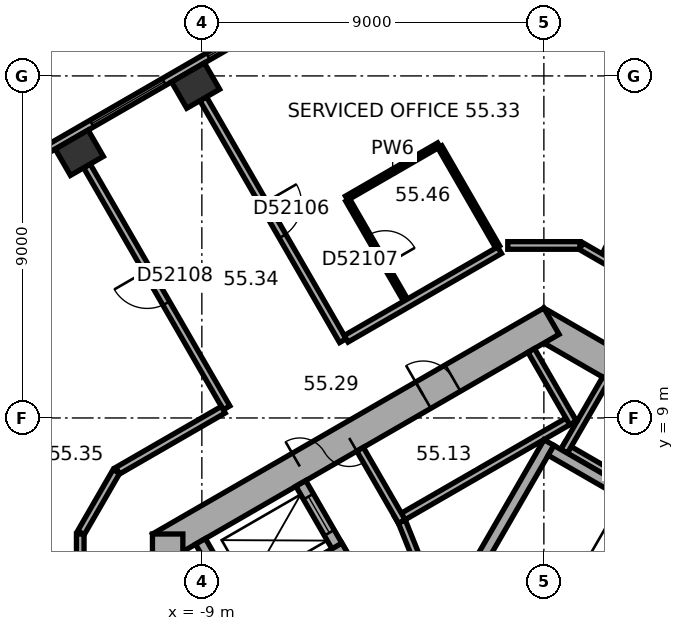
"""IFC4 building model, lengths in metres.
Left out: names, types, materials, properties, quantities, classifications, styles, units other than length and angle.
Written with IfcOpenShell. Run it as: python <this file> out.ifc"""

import sys

from ifc_helpers import new_model, si_unit, direction, frame, frame_2d, origin, origin_2d, place, context, subcontext, project, spatial, rectangle, extrude, element, fill, save


model = new_model("IFC4")
c1 = context("Model", 3, precision=1e-05, world=origin(), true_north=direction((0.0, 1.0)))
c2 = subcontext(c1, "Body", "Model", "MODEL_VIEW")
j1 = project(units=[si_unit("LENGTHUNIT", "METRE"), si_unit("PLANEANGLEUNIT", "RADIAN")], contexts=[c1])
p1 = place(None, origin())
s1 = spatial("IfcSite", under=j1, at=p1, CompositionType="ELEMENT")
p2 = place(p1, origin())
s2 = spatial("IfcBuilding", under=s1, at=p2, CompositionType="ELEMENT")
p3 = place(p2, frame((0.0, 0.0, 225.4)))
s3 = spatial("IfcBuildingStorey", under=s2, at=p3, CompositionType="ELEMENT", Elevation=225.4)
for number, where, z_axis, x_axis in (
    (1, (-9.165, 17.745, 0.0), (0.0, 0.0, 1.0), (-0.866, -0.5, 0.0)),
    (2, (-12.225, 15.978, 0.0), (0.0, 0.0, 1.0), (-0.866, -0.5, 0.0)),
):
    element("IfcColumn", number, at=place(p3, frame(where, z_axis=z_axis, x_axis=x_axis)), inside=s3, PredefinedType="COLUMN", context=c2, shape_type="SweptSolid", body=[
        extrude(rectangle(XDim=1.0, YDim=0.8, at=origin_2d()), origin(), (0.0, 0.0, 1.0), 3.7),
    ])
p4 = place(p3, frame((10.1, 5.6, 0.0), z_axis=(0.0, 0.0, 1.0), x_axis=(-0.866023897231, 0.500002609418, 0.0)))
e3 = element("IfcWall", 3, at=p4, inside=s3, PredefinedType="SHEAR", context=c2, shape_type="SweptSolid", body=[
    extrude(rectangle(XDim=11.894, YDim=0.8, at=frame_2d((5.947, 0.0))), origin(), (0.0, 0.0, 1.0), 3.7),
])
p5 = place(p4, frame((3.897, 0.0, 0.0)))
e4 = element("IfcOpeningElement", 4, at=p5, cuts=e3, PredefinedType="OPENING", context=c2, shape_type="SweptSolid", body=[
    extrude(rectangle(XDim=0.9, YDim=2.1, at=frame_2d((0.45, 1.05))), frame((0.0, 0.41, 0.0), z_axis=(0.0, -1.0, 0.0), x_axis=(1.0, 0.0, 0.0)), (0.0, 0.0, 1.0), 0.82),
])
p6 = place(p4, frame((7.797, 0.0, 0.0)))
e5 = element("IfcOpeningElement", 5, at=p6, cuts=e3, PredefinedType="OPENING", context=c2, shape_type="SweptSolid", body=[
    extrude(rectangle(XDim=0.9, YDim=2.1, at=frame_2d((0.45, 1.05))), frame((0.0, 0.41, 0.0), z_axis=(0.0, -1.0, 0.0), x_axis=(1.0, 0.0, 0.0)), (0.0, 0.0, 1.0), 0.82),
])
p7 = place(p3, frame((0.2, 11.547, 0.0), z_axis=(0.0, 0.0, 1.0), x_axis=(-0.866023897231, -0.500002609418, 0.0)))
e6 = element("IfcWall", 6, at=p7, inside=s3, PredefinedType="SHEAR", context=c2, shape_type="SweptSolid", body=[
    extrude(rectangle(XDim=11.894, YDim=0.8, at=frame_2d((5.947, 0.0))), origin(), (0.0, 0.0, 1.0), 3.7),
])
p8 = place(p7, frame((6.147, 0.0, 0.0)))
e7 = element("IfcOpeningElement", 7, at=p8, cuts=e6, PredefinedType="OPENING", context=c2, shape_type="SweptSolid", body=[
    extrude(rectangle(XDim=1.5, YDim=2.1, at=frame_2d((0.75, 1.05))), frame((0.0, 0.41, 0.0), z_axis=(0.0, -1.0, 0.0), x_axis=(1.0, 0.0, 0.0)), (0.0, 0.0, 1.0), 0.82),
])
p9 = place(p7, frame((2.997, 0.0, 0.0)))
e8 = element("IfcOpeningElement", 8, at=p9, cuts=e6, PredefinedType="OPENING", context=c2, shape_type="SweptSolid", body=[
    extrude(rectangle(XDim=0.9, YDim=2.1, at=frame_2d((0.45, 1.05))), frame((0.0, 0.41, 0.0), z_axis=(0.0, -1.0, 0.0), x_axis=(1.0, 0.0, 0.0)), (0.0, 0.0, 1.0), 0.82),
])
p10 = place(p3, frame((-9.9, 5.947, 0.0), z_axis=(0.0, 0.0, 1.0), x_axis=(0.0, -1.0, 0.0)))
e9 = element("IfcWall", 9, at=p10, inside=s3, PredefinedType="SHEAR", context=c2, shape_type="SweptSolid", body=[
    extrude(rectangle(XDim=11.894, YDim=0.8, at=frame_2d((5.947, 0.0))), origin(), (0.0, 0.0, 1.0), 3.7),
])
p11 = place(p10, frame((5.097, 0.0, 0.0)))
e10 = element("IfcOpeningElement", 10, at=p11, cuts=e9, PredefinedType="OPENING", context=c2, shape_type="SweptSolid", body=[
    extrude(rectangle(XDim=1.1, YDim=2.1, at=frame_2d((0.55, 1.05))), frame((0.0, 0.41, 0.0), z_axis=(0.0, -1.0, 0.0), x_axis=(1.0, 0.0, 0.0)), (0.0, 0.0, 1.0), 0.82),
])
p12 = place(p10, frame((7.697, 0.0, 0.0)))
e11 = element("IfcOpeningElement", 11, at=p12, cuts=e9, PredefinedType="OPENING", context=c2, shape_type="SweptSolid", body=[
    extrude(rectangle(XDim=1.1, YDim=2.1, at=frame_2d((0.55, 1.05))), frame((0.0, 0.41, 0.0), z_axis=(0.0, -1.0, 0.0), x_axis=(1.0, 0.0, 0.0)), (0.0, 0.0, 1.0), 0.82),
])
p13 = place(p3, frame((18.299, 13.727, 0.0), z_axis=(0.0, 0.0, 1.0), x_axis=(-0.894934554817, 0.44619742558, 0.0)))
e12 = element("IfcWall", 12, at=p13, inside=s3, PredefinedType="STANDARD", context=c2, shape_type="SweptSolid", body=[
    extrude(rectangle(XDim=18.841, YDim=0.2, at=frame_2d((9.421, 0.0))), origin(), (0.0, 0.0, 1.0), 3.7),
])
p14 = place(p13, frame((1.253, 0.0, 0.9)))
e13 = element("IfcOpeningElement", 13, at=p14, cuts=e12, PredefinedType="OPENING", context=c2, shape_type="SweptSolid", body=[
    extrude(rectangle(XDim=2.2, YDim=2.0, at=frame_2d((1.1, 1.0))), frame((0.0, 0.11, 0.0), z_axis=(0.0, -1.0, 0.0), x_axis=(1.0, 0.0, 0.0)), (0.0, 0.0, 1.0), 0.22),
])
p15 = place(p13, frame((4.786, 0.0, 0.9)))
e14 = element("IfcOpeningElement", 14, at=p15, cuts=e12, PredefinedType="OPENING", context=c2, shape_type="SweptSolid", body=[
    extrude(rectangle(XDim=2.2, YDim=2.0, at=frame_2d((1.1, 1.0))), frame((0.0, 0.11, 0.0), z_axis=(0.0, -1.0, 0.0), x_axis=(1.0, 0.0, 0.0)), (0.0, 0.0, 1.0), 0.22),
])
p16 = place(p13, frame((8.32, 0.0, 0.9)))
e15 = element("IfcOpeningElement", 15, at=p16, cuts=e12, PredefinedType="OPENING", context=c2, shape_type="SweptSolid", body=[
    extrude(rectangle(XDim=2.2, YDim=2.0, at=frame_2d((1.1, 1.0))), frame((0.0, 0.11, 0.0), z_axis=(0.0, -1.0, 0.0), x_axis=(1.0, 0.0, 0.0)), (0.0, 0.0, 1.0), 0.22),
])
p17 = place(p13, frame((11.854, 0.0, 0.9)))
e16 = element("IfcOpeningElement", 16, at=p17, cuts=e12, PredefinedType="OPENING", context=c2, shape_type="SweptSolid", body=[
    extrude(rectangle(XDim=2.2, YDim=2.0, at=frame_2d((1.1, 1.0))), frame((0.0, 0.11, 0.0), z_axis=(0.0, -1.0, 0.0), x_axis=(1.0, 0.0, 0.0)), (0.0, 0.0, 1.0), 0.22),
])
p18 = place(p13, frame((15.387, 0.0, 0.9)))
e17 = element("IfcOpeningElement", 17, at=p18, cuts=e12, PredefinedType="OPENING", context=c2, shape_type="SweptSolid", body=[
    extrude(rectangle(XDim=2.2, YDim=2.0, at=frame_2d((1.1, 1.0))), frame((0.0, 0.11, 0.0), z_axis=(0.0, -1.0, 0.0), x_axis=(1.0, 0.0, 0.0)), (0.0, 0.0, 1.0), 0.22),
])
p19 = place(p3, frame((-2.786, 22.005, 0.0), z_axis=(0.0, 0.0, 1.0), x_axis=(-0.866026555358, -0.49999800541, 0.0)))
e18 = element("IfcWall", 18, at=p19, inside=s3, PredefinedType="STANDARD", context=c2, shape_type="SweptSolid", body=[
    extrude(rectangle(XDim=18.841, YDim=0.2, at=frame_2d((9.421, 0.0))), origin(), (0.0, 0.0, 1.0), 3.7),
])
p20 = place(p19, frame((1.254, 0.0, 0.9)))
e19 = element("IfcOpeningElement", 19, at=p20, cuts=e18, PredefinedType="OPENING", context=c2, shape_type="SweptSolid", body=[
    extrude(rectangle(XDim=2.2, YDim=2.0, at=frame_2d((1.1, 1.0))), frame((0.0, 0.11, 0.0), z_axis=(0.0, -1.0, 0.0), x_axis=(1.0, 0.0, 0.0)), (0.0, 0.0, 1.0), 0.22),
])
p21 = place(p19, frame((4.788, 0.0, 0.9)))
e20 = element("IfcOpeningElement", 20, at=p21, cuts=e18, PredefinedType="OPENING", context=c2, shape_type="SweptSolid", body=[
    extrude(rectangle(XDim=2.2, YDim=2.0, at=frame_2d((1.1, 1.0))), frame((0.0, 0.11, 0.0), z_axis=(0.0, -1.0, 0.0), x_axis=(1.0, 0.0, 0.0)), (0.0, 0.0, 1.0), 0.22),
])
p22 = place(p19, frame((8.321, 0.0, 0.9)))
e21 = element("IfcOpeningElement", 21, at=p22, cuts=e18, PredefinedType="OPENING", context=c2, shape_type="SweptSolid", body=[
    extrude(rectangle(XDim=2.2, YDim=2.0, at=frame_2d((1.1, 1.0))), frame((0.0, 0.11, 0.0), z_axis=(0.0, -1.0, 0.0), x_axis=(1.0, 0.0, 0.0)), (0.0, 0.0, 1.0), 0.22),
])
p23 = place(p19, frame((11.855, 0.0, 0.9)))
e22 = element("IfcOpeningElement", 22, at=p23, cuts=e18, PredefinedType="OPENING", context=c2, shape_type="SweptSolid", body=[
    extrude(rectangle(XDim=2.2, YDim=2.0, at=frame_2d((1.1, 1.0))), frame((0.0, 0.11, 0.0), z_axis=(0.0, -1.0, 0.0), x_axis=(1.0, 0.0, 0.0)), (0.0, 0.0, 1.0), 0.22),
])
p24 = place(p19, frame((15.389, 0.0, 0.9)))
e23 = element("IfcOpeningElement", 23, at=p24, cuts=e18, PredefinedType="OPENING", context=c2, shape_type="SweptSolid", body=[
    extrude(rectangle(XDim=2.2, YDim=2.0, at=frame_2d((1.1, 1.0))), frame((0.0, 0.11, 0.0), z_axis=(0.0, -1.0, 0.0), x_axis=(1.0, 0.0, 0.0)), (0.0, 0.0, 1.0), 0.22),
])
p25 = place(p3, frame((7.424, 4.259, 0.0), z_axis=(0.0, 0.0, 1.0), x_axis=(-0.866026010844, 0.49999894854, 0.0)))
e24 = element("IfcWall", 24, at=p25, inside=s3, PredefinedType="PARTITIONING", context=c2, shape_type="SweptSolid", body=[
    extrude(rectangle(XDim=8.0, YDim=0.2, at=frame_2d((4.0, 0.0))), origin(), (0.0, 0.0, 1.0), 3.42),
])
p26 = place(p3, frame((0.532, 8.122, 0.0), z_axis=(0.0, 0.0, 1.0), x_axis=(0.500077893725, 0.86598042715, 0.0)))
e25 = element("IfcWall", 25, at=p26, inside=s3, PredefinedType="PARTITIONING", context=c2, shape_type="SweptSolid", body=[
    extrude(rectangle(XDim=2.2, YDim=0.2, at=frame_2d((1.1, 0.0))), origin(), (0.0, 0.0, 1.0), 3.42),
])
p27 = place(p3, frame((0.803, 9.009, 0.0), z_axis=(0.0, 0.0, 1.0), x_axis=(-0.866028230842, -0.499995103361, 0.0)))
e26 = element("IfcWall", 26, at=p27, inside=s3, PredefinedType="PARTITIONING", context=c2, shape_type="SweptSolid", body=[
    extrude(rectangle(XDim=5.4, YDim=0.2, at=frame_2d((2.7, 0.0))), origin(), (0.0, 0.0, 1.0), 3.42),
])
p28 = place(p3, frame((0.767, 8.872, 0.0), z_axis=(0.0, 0.0, 1.0), x_axis=(-0.499994660107, 0.866028486751, 0.0)))
e27 = element("IfcWall", 27, at=p28, inside=s3, PredefinedType="PARTITIONING", context=c2, shape_type="SweptSolid", body=[
    extrude(rectangle(XDim=2.2, YDim=0.2, at=frame_2d((1.1, 0.0))), origin(), (0.0, 0.0, 1.0), 3.42),
])
p29 = place(p3, frame((-3.737, 6.272, 0.0), z_axis=(0.0, 0.0, 1.0), x_axis=(-0.50002983664, 0.866008176907, 0.0)))
e28 = element("IfcWall", 28, at=p29, inside=s3, PredefinedType="PARTITIONING", context=c2, shape_type="SweptSolid", body=[
    extrude(rectangle(XDim=2.2, YDim=0.2, at=frame_2d((1.1, 0.0))), origin(), (0.0, 0.0, 1.0), 3.42),
])
p30 = place(p3, frame((-2.216, 4.282, 0.0), z_axis=(0.0, 0.0, 1.0), x_axis=(0.499977259774, 0.866038532462, 0.0)))
e29 = element("IfcWall", 29, at=p30, inside=s3, PredefinedType="SHEAR", context=c2, shape_type="SweptSolid", body=[
    extrude(rectangle(XDim=4.7, YDim=0.3, at=frame_2d((2.35, 0.0))), origin(), (0.0, 0.0, 1.0), 3.42),
])
p31 = place(p3, frame((6.303, 4.617, 0.0), z_axis=(0.0, 0.0, 1.0), x_axis=(-0.866027801685, 0.499995846692, 0.0)))
e30 = element("IfcWall", 30, at=p31, inside=s3, PredefinedType="SHEAR", context=c2, shape_type="SweptSolid", body=[
    extrude(rectangle(XDim=7.06, YDim=0.3, at=frame_2d((3.53, 0.0))), origin(), (0.0, 0.0, 1.0), 3.42),
])
p32 = place(p3, frame((-5.295, 5.372, 0.0), z_axis=(0.0, 0.0, 1.0), x_axis=(-0.500077893725, 0.86598042715, 0.0)))
e31 = element("IfcWall", 31, at=p32, inside=s3, PredefinedType="SHEAR", context=c2, shape_type="SweptSolid", body=[
    extrude(rectangle(XDim=2.2, YDim=0.3, at=frame_2d((1.1, 0.0))), origin(), (0.0, 0.0, 1.0), 3.42),
])
p33 = place(p32, frame((0.7, 0.0, 0.0)))
e32 = element("IfcOpeningElement", 32, at=p33, cuts=e31, PredefinedType="OPENING", context=c2, shape_type="SweptSolid", body=[
    extrude(rectangle(XDim=1.1, YDim=2.1, at=frame_2d((0.55, 1.05))), frame((0.0, 0.16, 0.0), z_axis=(0.0, -1.0, 0.0), x_axis=(1.0, 0.0, 0.0)), (0.0, 0.0, 1.0), 0.32),
])
p34 = place(p3, frame((-5.24, 5.577, 0.0), z_axis=(0.0, 0.0, 1.0), x_axis=(-0.866014461049, -0.500018952895, 0.0)))
e33 = element("IfcWall", 33, at=p34, inside=s3, PredefinedType="SHEAR", context=c2, shape_type="SweptSolid", body=[
    extrude(rectangle(XDim=3.35, YDim=0.3, at=frame_2d((1.675, 0.0))), origin(), (0.0, 0.0, 1.0), 3.42),
])
p35 = place(p3, frame((-7.937, 3.847, 0.0), z_axis=(0.0, 0.0, 1.0), x_axis=(-0.50002983664, 0.866008176907, 0.0)))
e34 = element("IfcWall", 34, at=p35, inside=s3, PredefinedType="SHEAR", context=c2, shape_type="SweptSolid", body=[
    extrude(rectangle(XDim=2.2, YDim=0.3, at=frame_2d((1.1, 0.0))), origin(), (0.0, 0.0, 1.0), 3.42),
])
p36 = place(p3, frame((-2.615, 3.487, 0.0), z_axis=(0.0, 0.0, 1.0), x_axis=(-0.373576831041, 0.92759924068, 0.0)))
e35 = element("IfcWall", 35, at=p36, inside=s3, PredefinedType="PARTITIONING", context=c2, shape_type="SweptSolid", body=[
    extrude(rectangle(XDim=3.002, YDim=0.2, at=frame_2d((1.501, 0.0))), origin(), (0.0, 0.0, 1.0), 3.42),
])
p37 = place(p36, frame((1.15, 0.0, 0.0)))
e36 = element("IfcOpeningElement", 36, at=p37, cuts=e35, PredefinedType="OPENING", context=c2, shape_type="SweptSolid", body=[
    extrude(rectangle(XDim=0.9, YDim=2.1, at=frame_2d((0.45, 1.05))), frame((0.0, 0.11, 0.0), z_axis=(0.0, -1.0, 0.0), x_axis=(1.0, 0.0, 0.0)), (0.0, 0.0, 1.0), 0.22),
])
p38 = place(p3, frame((-12.2, 5.947, 0.0), z_axis=(0.0, 0.0, 1.0), x_axis=(0.0, -1.0, 0.0)))
e37 = element("IfcWall", 37, at=p38, inside=s3, PredefinedType="PARTITIONING", context=c2, shape_type="SweptSolid", body=[
    extrude(rectangle(XDim=3.746, YDim=0.2, at=frame_2d((1.873, 0.0))), origin(), (0.0, 0.0, 1.0), 3.42),
])
p39 = place(p3, frame((-12.025, 15.632, 0.0), z_axis=(0.0, 0.0, 1.0), x_axis=(0.499983153418, -0.866035129944, 0.0)))
e38 = element("IfcWall", 38, at=p39, inside=s3, PredefinedType="PARTITIONING", context=c2, shape_type="SweptSolid", body=[
    extrude(rectangle(XDim=7.35, YDim=0.2, at=frame_2d((3.675, 0.0))), origin(), (0.0, 0.0, 1.0), 3.42),
])
p40 = place(p39, frame((3.175, 0.0, 0.0)))
e39 = element("IfcOpeningElement", 39, at=p40, cuts=e38, PredefinedType="OPENING", context=c2, shape_type="SweptSolid", body=[
    extrude(rectangle(XDim=1.0, YDim=2.1, at=frame_2d((0.5, 1.05))), frame((0.0, 0.11, 0.0), z_axis=(0.0, -1.0, 0.0), x_axis=(1.0, 0.0, 0.0)), (0.0, 0.0, 1.0), 0.22),
])
p41 = place(p3, frame((-11.25, 7.592, 0.0), z_axis=(0.0, 0.0, 1.0), x_axis=(-0.499964847546, -0.866045698112, 0.0)))
e40 = element("IfcWall", 40, at=p41, inside=s3, PredefinedType="PARTITIONING", context=c2, shape_type="SweptSolid", body=[
    extrude(rectangle(XDim=1.86, YDim=0.2, at=frame_2d((0.93, 0.0))), origin(), (0.0, 0.0, 1.0), 3.42),
])
p42 = place(p3, frame((-8.965, 17.399, 0.0), z_axis=(0.0, 0.0, 1.0), x_axis=(0.499993683172, -0.866029050776, 0.0)))
e41 = element("IfcWall", 41, at=p42, inside=s3, PredefinedType="PARTITIONING", context=c2, shape_type="SweptSolid", body=[
    extrude(rectangle(XDim=7.35, YDim=0.2, at=frame_2d((3.675, 0.0))), origin(), (0.0, 0.0, 1.0), 2.87),
])
p43 = place(p42, frame((3.175, 0.0, 0.0)))
e42 = element("IfcOpeningElement", 42, at=p43, cuts=e41, PredefinedType="OPENING", context=c2, shape_type="SweptSolid", body=[
    extrude(rectangle(XDim=1.0, YDim=2.1, at=frame_2d((0.5, 1.05))), frame((0.0, 0.11, 0.0), z_axis=(0.0, -1.0, 0.0), x_axis=(1.0, 0.0, 0.0)), (0.0, 0.0, 1.0), 0.22),
])
p44 = place(p3, frame((-8.437, 9.217, 0.0), z_axis=(0.0, 0.0, 1.0), x_axis=(-0.866005660673, -0.500034194513, 0.0)))
e43 = element("IfcWall", 43, at=p44, inside=s3, PredefinedType="PARTITIONING", context=c2, shape_type="SweptSolid", body=[
    extrude(rectangle(XDim=3.209, YDim=0.2, at=frame_2d((1.604, 0.0))), origin(), (0.0, 0.0, 1.0), 3.42),
])
p45 = place(p3, frame((-5.191, 14.785, 0.0), z_axis=(0.0, 0.0, 1.0), x_axis=(0.866034573852, 0.49998411664, 0.0)))
e44 = element("IfcWall", 44, at=p45, inside=s3, PredefinedType="PARTITIONING", context=c2, shape_type="SweptSolid", body=[
    extrude(rectangle(XDim=2.8, YDim=0.12, at=frame_2d((1.4, 0.0))), origin(), (0.0, 0.0, 1.0), 3.42),
])
p46 = place(p3, frame((-3.641, 12.101, 0.0), z_axis=(0.0, 0.0, 1.0), x_axis=(-0.500026023896, 0.86601037836, 0.0)))
e45 = element("IfcWall", 45, at=p46, inside=s3, PredefinedType="PARTITIONING", context=c2, shape_type="SweptSolid", body=[
    extrude(rectangle(XDim=3.04, YDim=0.12, at=frame_2d((1.52, 0.0))), origin(), (0.0, 0.0, 1.0), 3.42),
])
p47 = place(p46, frame((1.07, 0.0, 0.0)))
e46 = element("IfcOpeningElement", 46, at=p47, cuts=e45, PredefinedType="OPENING", context=c2, shape_type="SweptSolid", body=[
    extrude(rectangle(XDim=0.9, YDim=2.1, at=frame_2d((0.45, 1.05))), frame((0.0, 0.07, 0.0), z_axis=(0.0, -1.0, 0.0), x_axis=(1.0, 0.0, 0.0)), (0.0, 0.0, 1.0), 0.14),
])
p48 = place(p3, frame((-2.737, 16.133, 0.0), z_axis=(0.0, 0.0, 1.0), x_axis=(0.500026023896, -0.86601037836, 0.0)))
e47 = element("IfcWall", 47, at=p48, inside=s3, PredefinedType="PARTITIONING", context=c2, shape_type="SweptSolid", body=[
    extrude(rectangle(XDim=3.04, YDim=0.12, at=frame_2d((1.52, 0.0))), origin(), (0.0, 0.0, 1.0), 3.42),
])
p49 = place(p3, frame((-1.167, 13.414, 0.0), z_axis=(0.0, 0.0, 1.0), x_axis=(-0.866023347809, -0.500003561037, 0.0)))
e48 = element("IfcWall", 48, at=p49, inside=s3, PredefinedType="PARTITIONING", context=c2, shape_type="SweptSolid", body=[
    extrude(rectangle(XDim=4.661, YDim=0.2, at=frame_2d((2.331, 0.0))), origin(), (0.0, 0.0, 1.0), 3.42),
])
p50 = place(p3, frame((0.95, 13.539, 0.0), z_axis=(0.0, 0.0, 1.0), x_axis=(-1.0, 0.0, 0.0)))
e49 = element("IfcWall", 49, at=p50, inside=s3, PredefinedType="PARTITIONING", context=c2, shape_type="SweptSolid", body=[
    extrude(rectangle(XDim=1.9, YDim=0.2, at=frame_2d((0.95, 0.0))), origin(), (0.0, 0.0, 1.0), 3.42),
])
p51 = place(p3, frame((4.723, 19.49, 0.0), z_axis=(0.0, 0.0, 1.0), x_axis=(-0.446186614574, -0.894939944898, 0.0)))
e50 = element("IfcWall", 50, at=p51, inside=s3, PredefinedType="PARTITIONING", context=c2, shape_type="SweptSolid", body=[
    extrude(rectangle(XDim=6.944, YDim=0.2, at=frame_2d((3.472, 0.0))), origin(), (0.0, 0.0, 1.0), 2.87),
])
p52 = place(p3, frame((8.721, 9.052, 0.0), z_axis=(0.0, 0.0, 1.0), x_axis=(-0.866028125821, 0.499995285264, 0.0)))
e51 = element("IfcWall", 51, at=p52, inside=s3, PredefinedType="PARTITIONING", context=c2, shape_type="SweptSolid", body=[
    extrude(rectangle(XDim=8.934, YDim=0.2, at=frame_2d((4.467, 0.0))), origin(), (0.0, 0.0, 1.0), 3.42),
])
p53 = place(p52, frame((5.05, 0.0, 0.0)))
e52 = element("IfcOpeningElement", 52, at=p53, cuts=e51, PredefinedType="OPENING", context=c2, shape_type="SweptSolid", body=[
    extrude(rectangle(XDim=1.0, YDim=2.1, at=frame_2d((0.5, 1.05))), frame((0.0, 0.11, 0.0), z_axis=(0.0, -1.0, 0.0), x_axis=(1.0, 0.0, 0.0)), (0.0, 0.0, 1.0), 0.22),
])
p54 = place(p21, origin())
e53 = element("IfcWindow", 53, at=p54, inside=s3, PartitioningType="SINGLE_PANEL", PredefinedType="WINDOW", context=c2, shape_type="SweptSolid", body=[
    extrude(rectangle(XDim=2.2, YDim=2.0, at=frame_2d((1.1, 1.0))), frame((0.0, 0.03, 0.0), z_axis=(0.0, -1.0, 0.0), x_axis=(1.0, 0.0, 0.0)), (0.0, 0.0, 1.0), 0.06),
])
fill(e20, e53)
p55 = place(p22, origin())
e54 = element("IfcWindow", 54, at=p55, inside=s3, PartitioningType="SINGLE_PANEL", PredefinedType="WINDOW", context=c2, shape_type="SweptSolid", body=[
    extrude(rectangle(XDim=2.2, YDim=2.0, at=frame_2d((1.1, 1.0))), frame((0.0, 0.03, 0.0), z_axis=(0.0, -1.0, 0.0), x_axis=(1.0, 0.0, 0.0)), (0.0, 0.0, 1.0), 0.06),
])
fill(e21, e54)
p56 = place(p8, origin())
e55 = element("IfcDoor", 55, at=p56, inside=s3, OperationType="DOUBLE_DOOR_SINGLE_SWING", PredefinedType="DOOR", context=c2, shape_type="SweptSolid", body=[
    extrude(rectangle(XDim=1.5, YDim=2.1, at=frame_2d((0.75, 1.05))), frame((0.0, 0.025, 0.0), z_axis=(0.0, -1.0, 0.0), x_axis=(1.0, 0.0, 0.0)), (0.0, 0.0, 1.0), 0.05),
])
fill(e7, e55)
p57 = place(p9, origin())
e56 = element("IfcDoor", 56, at=p57, inside=s3, OperationType="SINGLE_SWING_LEFT", PredefinedType="DOOR", context=c2, shape_type="SweptSolid", body=[
    extrude(rectangle(XDim=0.9, YDim=2.1, at=frame_2d((0.45, 1.05))), frame((0.0, 0.025, 0.0), z_axis=(0.0, -1.0, 0.0), x_axis=(1.0, 0.0, 0.0)), (0.0, 0.0, 1.0), 0.05),
])
fill(e8, e56)
p58 = place(p33, origin())
e57 = element("IfcDoor", 57, at=p58, inside=s3, OperationType="DOUBLE_DOOR_SLIDING", PredefinedType="DOOR", context=c2, shape_type="SweptSolid", body=[
    extrude(rectangle(XDim=1.1, YDim=2.1, at=frame_2d((0.55, 1.05))), frame((0.0, 0.025, 0.0), z_axis=(0.0, -1.0, 0.0), x_axis=(1.0, 0.0, 0.0)), (0.0, 0.0, 1.0), 0.05),
])
fill(e32, e57)
p59 = place(p43, origin())
e58 = element("IfcDoor", 58, at=p59, inside=s3, OperationType="SINGLE_SWING_LEFT", PredefinedType="DOOR", context=c2, shape_type="SweptSolid", body=[
    extrude(rectangle(XDim=1.0, YDim=2.1, at=frame_2d((0.5, 1.05))), frame((0.0, 0.025, 0.0), z_axis=(0.0, -1.0, 0.0), x_axis=(1.0, 0.0, 0.0)), (0.0, 0.0, 1.0), 0.05),
])
fill(e42, e58)
p60 = place(p47, origin())
e59 = element("IfcDoor", 59, at=p60, inside=s3, OperationType="SINGLE_SWING_LEFT", PredefinedType="DOOR", context=c2, shape_type="SweptSolid", body=[
    extrude(rectangle(XDim=0.9, YDim=2.1, at=frame_2d((0.45, 1.05))), frame((0.0, 0.025, 0.0), z_axis=(0.0, -1.0, 0.0), x_axis=(1.0, 0.0, 0.0)), (0.0, 0.0, 1.0), 0.05),
])
fill(e46, e59)
p61 = place(p40, origin())
e60 = element("IfcDoor", 60, at=p61, inside=s3, OperationType="SINGLE_SWING_LEFT", PredefinedType="DOOR", context=c2, shape_type="SweptSolid", body=[
    extrude(rectangle(XDim=1.0, YDim=2.1, at=frame_2d((0.5, 1.05))), frame((0.0, 0.025, 0.0), z_axis=(0.0, -1.0, 0.0), x_axis=(1.0, 0.0, 0.0)), (0.0, 0.0, 1.0), 0.05),
])
fill(e39, e60)
save(model, sys.argv[1])
